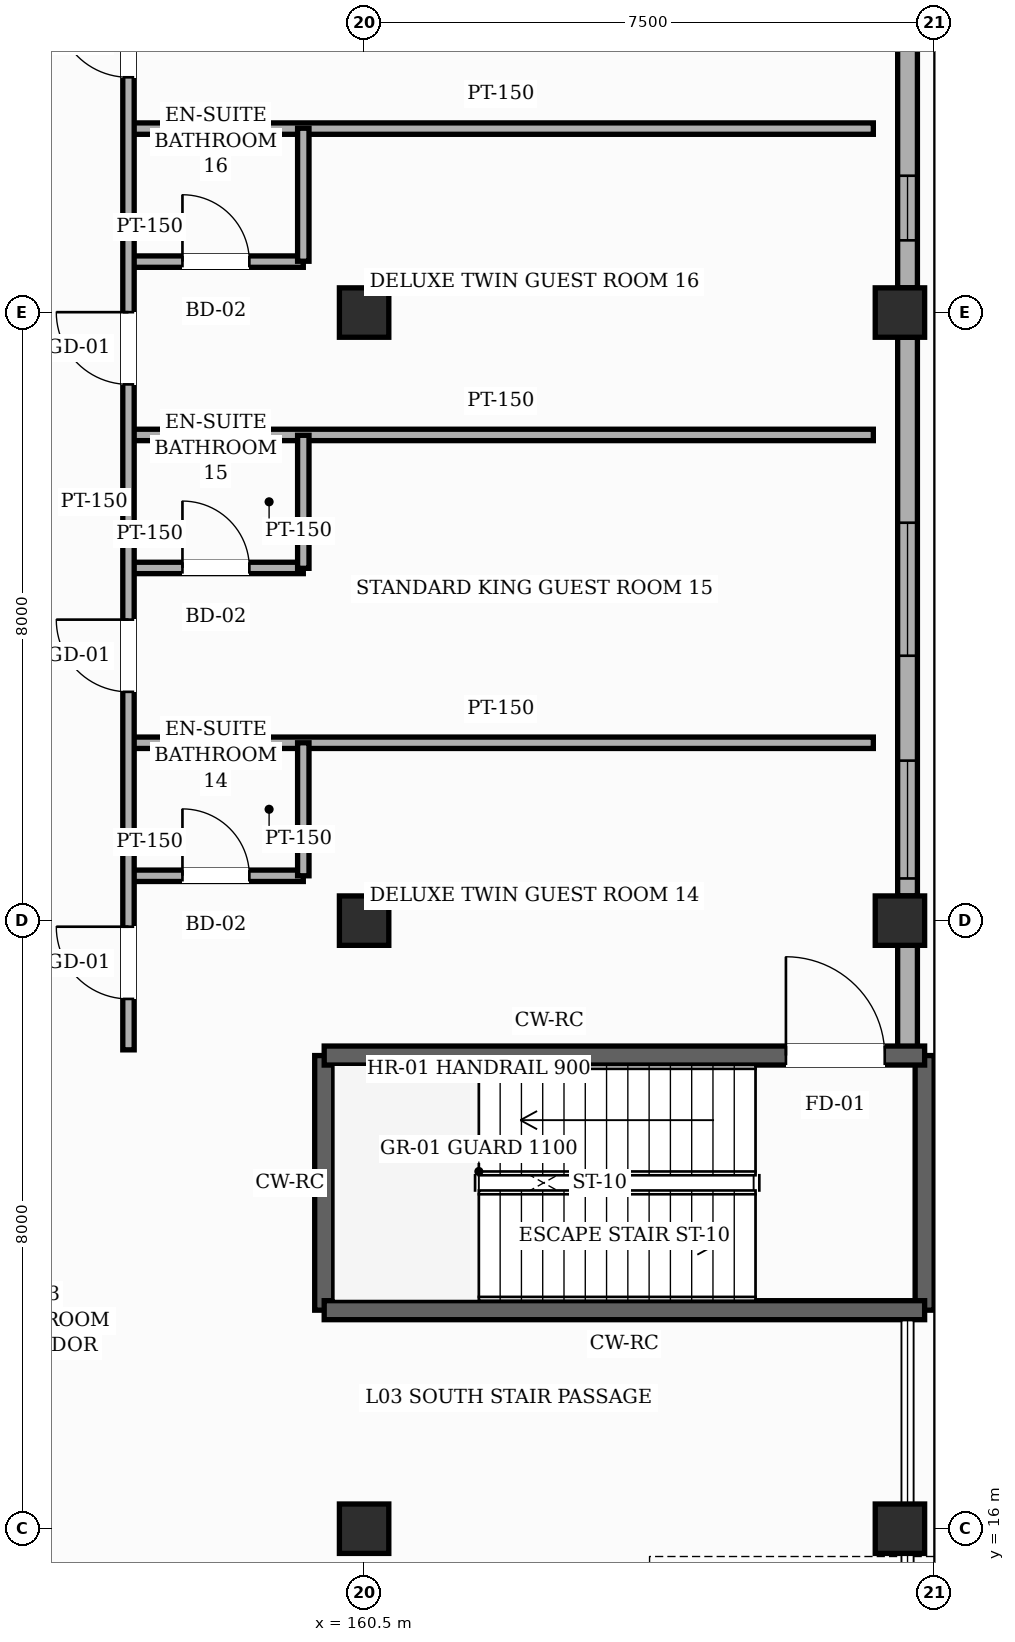
"""IFC4 building model, lengths in metres.
Left out: names, types, materials, properties, quantities, classifications, styles, units other than length and angle.
Written with IfcOpenShell. Run it as: python <this file> out.ifc"""

import sys

from ifc_helpers import new_model, si_unit, direction, frame, frame_2d, origin, origin_2d, place, context, subcontext, project, spatial, rectangle, hollow_rectangle, extrude, element, fill, save


model = new_model("IFC4")
c1 = context("Model", 3, precision=1e-05, world=origin(), true_north=direction((0.0, 1.0)))
c2 = subcontext(c1, "Body", "Model", "MODEL_VIEW")
j1 = project(units=[si_unit("LENGTHUNIT", "METRE"), si_unit("PLANEANGLEUNIT", "RADIAN")], contexts=[c1])
p1 = place(None, origin())
s1 = spatial("IfcSite", under=j1, at=p1, CompositionType="ELEMENT")
p2 = place(p1, origin())
s2 = spatial("IfcBuilding", under=s1, at=p2, CompositionType="ELEMENT")
p3 = place(p2, frame((0.0, 0.0, 15.0)))
s3 = spatial("IfcBuildingStorey", under=s2, at=p3, CompositionType="ELEMENT", Elevation=15.0)
for number, where, z_axis, x_axis in (
    (1, (160.5, 16.0, 0.0), (0.0, 0.0, 1.0), (1.0, 0.0, 0.0)),
    (2, (160.5, 24.0, 0.0), (0.0, 0.0, 1.0), (1.0, 0.0, 0.0)),
    (3, (160.5, 32.0, 0.0), (0.0, 0.0, 1.0), (1.0, 0.0, 0.0)),
    (4, (167.55, 16.0, 0.0), (0.0, 0.0, 1.0), (1.0, 0.0, 0.0)),
    (5, (167.55, 24.0, 0.0), (0.0, 0.0, 1.0), (1.0, 0.0, 0.0)),
    (6, (167.55, 32.0, 0.0), (0.0, 0.0, 1.0), (1.0, 0.0, 0.0)),
):
    element("IfcColumn", number, at=place(p3, frame(where, z_axis=z_axis, x_axis=x_axis)), inside=s3, PredefinedType="COLUMN", context=c2, shape_type="SweptSolid", body=[
        extrude(hollow_rectangle(XDim=0.65, YDim=0.65, WallThickness=0.025, InnerFilletRadius=0.025, OuterFilletRadius=0.05, at=origin_2d()), origin(), (0.0, 0.0, 1.0), 4.8),
    ])
p4 = place(p3, frame((167.65, 23.675, 0.0), z_axis=(0.0, 0.0, 1.0), x_axis=(0.0, -1.0, 0.0)))
e7 = element("IfcWall", 7, at=p4, inside=s3, PredefinedType="SOLIDWALL", context=c2, shape_type="SweptSolid", body=[
    extrude(rectangle(XDim=1.45, YDim=0.26, at=frame_2d((0.725, 0.0))), origin(), (0.0, 0.0, 1.0), 4.545),
])
p5 = place(p3, frame((167.65, 31.675, 0.0), z_axis=(0.0, 0.0, 1.0), x_axis=(0.0, -1.0, 0.0)))
e8 = element("IfcWall", 8, at=p5, inside=s3, PredefinedType="SOLIDWALL", context=c2, shape_type="SweptSolid", body=[
    extrude(rectangle(XDim=7.35, YDim=0.26, at=frame_2d((3.675, 0.0))), origin(), (0.0, 0.0, 1.0), 3.885),
])
p6 = place(p5, frame((5.57, 0.0, 0.85)))
e9 = element("IfcOpeningElement", 9, at=p6, cuts=e8, PredefinedType="OPENING", context=c2, shape_type="SweptSolid", body=[
    extrude(rectangle(XDim=1.55, YDim=1.95, at=frame_2d((0.775, 0.975))), frame((0.0, 0.14, 0.0), z_axis=(0.0, -1.0, 0.0), x_axis=(1.0, 0.0, 0.0)), (0.0, 0.0, 1.0), 0.28),
])
p7 = place(p5, frame((2.44, 0.0, 0.85)))
e10 = element("IfcOpeningElement", 10, at=p7, cuts=e8, PredefinedType="OPENING", context=c2, shape_type="SweptSolid", body=[
    extrude(rectangle(XDim=1.75, YDim=1.95, at=frame_2d((0.875, 0.975))), frame((0.0, 0.14, 0.0), z_axis=(0.0, -1.0, 0.0), x_axis=(1.0, 0.0, 0.0)), (0.0, 0.0, 1.0), 0.28),
])
p8 = place(p3, frame((167.65, 40.575, 0.0), z_axis=(0.0, 0.0, 1.0), x_axis=(0.0, -1.0, 0.0)))
e11 = element("IfcWall", 11, at=p8, inside=s3, PredefinedType="SOLIDWALL", context=c2, shape_type="SweptSolid", body=[
    extrude(rectangle(XDim=8.25, YDim=0.26, at=frame_2d((4.125, 0.0))), origin(), (0.0, 0.0, 1.0), 3.885),
])
p9 = place(p8, frame((6.775, 0.0, 0.85)))
e12 = element("IfcOpeningElement", 12, at=p9, cuts=e11, PredefinedType="OPENING", context=c2, shape_type="SweptSolid", body=[
    extrude(rectangle(XDim=0.85, YDim=1.35, at=frame_2d((0.425, 0.675))), frame((0.0, 0.14, 0.0), z_axis=(0.0, -1.0, 0.0), x_axis=(1.0, 0.0, 0.0)), (0.0, 0.0, 1.0), 0.28),
])
p10 = place(p8, frame((3.555, 0.0, 0.85)))
e13 = element("IfcOpeningElement", 13, at=p10, cuts=e11, PredefinedType="OPENING", context=c2, shape_type="SweptSolid", body=[
    extrude(rectangle(XDim=1.15, YDim=1.35, at=frame_2d((0.575, 0.675))), frame((0.0, 0.14, 0.0), z_axis=(0.0, -1.0, 0.0), x_axis=(1.0, 0.0, 0.0)), (0.0, 0.0, 1.0), 0.28),
])
p11 = place(p8, frame((0.38, 0.0, 0.85)))
e14 = element("IfcOpeningElement", 14, at=p11, cuts=e11, PredefinedType="OPENING", context=c2, shape_type="SweptSolid", body=[
    extrude(rectangle(XDim=1.35, YDim=1.35, at=frame_2d((0.675, 0.675))), frame((0.0, 0.14, 0.0), z_axis=(0.0, -1.0, 0.0), x_axis=(1.0, 0.0, 0.0)), (0.0, 0.0, 1.0), 0.28),
])
for number, where, z_axis, x_axis in (
    (15, (167.875, 22.225, 0.0), (0.0, 0.0, 1.0), (0.0, -1.0, 0.0)),
    (16, (159.975, 18.875, 0.0), (0.0, 0.0, 1.0), (0.0, 1.0, 0.0)),
):
    element("IfcWall", number, at=place(p3, frame(where, z_axis=z_axis, x_axis=x_axis)), inside=s3, PredefinedType="SHEAR", context=c2, shape_type="SweptSolid", body=[
        extrude(rectangle(XDim=3.35, YDim=0.25, at=frame_2d((1.675, 0.0))), origin(), (0.0, 0.0, 1.0), 4.56),
    ])
p12 = place(p3, frame((159.975, 22.225, 0.0), z_axis=(0.0, 0.0, 1.0), x_axis=(1.0, 0.0, 0.0)))
e17 = element("IfcWall", 17, at=p12, inside=s3, PredefinedType="SHEAR", context=c2, shape_type="SweptSolid", body=[
    extrude(rectangle(XDim=7.9, YDim=0.25, at=frame_2d((3.95, 0.0))), origin(), (0.0, 0.0, 1.0), 4.56),
])
p13 = place(p12, frame((6.075, 0.0, 0.0)))
e18 = element("IfcOpeningElement", 18, at=p13, cuts=e17, PredefinedType="OPENING", context=c2, shape_type="SweptSolid", body=[
    extrude(rectangle(XDim=1.3, YDim=2.2, at=frame_2d((0.65, 1.1))), frame((0.0, 0.135, 0.0), z_axis=(0.0, -1.0, 0.0), x_axis=(1.0, 0.0, 0.0)), (0.0, 0.0, 1.0), 0.27),
])
p14 = place(p3, frame((167.875, 18.875, 0.0), z_axis=(0.0, 0.0, 1.0), x_axis=(-1.0, 0.0, 0.0)))
e19 = element("IfcWall", 19, at=p14, inside=s3, PredefinedType="SHEAR", context=c2, shape_type="SweptSolid", body=[
    extrude(rectangle(XDim=7.9, YDim=0.25, at=frame_2d((3.95, 0.0))), origin(), (0.0, 0.0, 1.0), 4.56),
])
p15 = place(p3, frame((157.4, 24.59, 0.0), z_axis=(0.0, 0.0, 1.0), x_axis=(1.0, 0.0, 0.0)))
e20 = element("IfcWall", 20, at=p15, inside=s3, PredefinedType="PARTITIONING", context=c2, shape_type="SweptSolid", body=[
    extrude(rectangle(XDim=2.3, YDim=0.15, at=frame_2d((1.15, 0.0))), origin(), (0.0, 0.0, 1.0), 4.545),
])
p16 = place(p15, frame((0.71, 0.0, 0.0)))
e21 = element("IfcOpeningElement", 21, at=p16, cuts=e20, PredefinedType="OPENING", context=c2, shape_type="SweptSolid", body=[
    extrude(rectangle(XDim=0.88, YDim=2.12, at=frame_2d((0.44, 1.06))), frame((0.0, 0.085, 0.0), z_axis=(0.0, -1.0, 0.0), x_axis=(1.0, 0.0, 0.0)), (0.0, 0.0, 1.0), 0.17),
])
p17 = place(p3, frame((157.4, 26.34, 0.0), z_axis=(0.0, 0.0, 1.0), x_axis=(1.0, 0.0, 0.0)))
e22 = element("IfcWall", 22, at=p17, inside=s3, PredefinedType="PARTITIONING", context=c2, shape_type="SweptSolid", body=[
    extrude(rectangle(XDim=9.8, YDim=0.15, at=frame_2d((4.9, 0.0))), origin(), (0.0, 0.0, 1.0), 4.545),
])
p18 = place(p3, frame((157.4, 28.64, 0.0), z_axis=(0.0, 0.0, 1.0), x_axis=(1.0, 0.0, 0.0)))
e23 = element("IfcWall", 23, at=p18, inside=s3, PredefinedType="PARTITIONING", context=c2, shape_type="SweptSolid", body=[
    extrude(rectangle(XDim=2.3, YDim=0.15, at=frame_2d((1.15, 0.0))), origin(), (0.0, 0.0, 1.0), 4.545),
])
p19 = place(p18, frame((0.71, 0.0, 0.0)))
e24 = element("IfcOpeningElement", 24, at=p19, cuts=e23, PredefinedType="OPENING", context=c2, shape_type="SweptSolid", body=[
    extrude(rectangle(XDim=0.88, YDim=2.12, at=frame_2d((0.44, 1.06))), frame((0.0, 0.085, 0.0), z_axis=(0.0, -1.0, 0.0), x_axis=(1.0, 0.0, 0.0)), (0.0, 0.0, 1.0), 0.17),
])
p20 = place(p3, frame((157.4, 30.39, 0.0), z_axis=(0.0, 0.0, 1.0), x_axis=(1.0, 0.0, 0.0)))
e25 = element("IfcWall", 25, at=p20, inside=s3, PredefinedType="PARTITIONING", context=c2, shape_type="SweptSolid", body=[
    extrude(rectangle(XDim=9.8, YDim=0.15, at=frame_2d((4.9, 0.0))), origin(), (0.0, 0.0, 1.0), 4.545),
])
p21 = place(p3, frame((157.4, 32.67, 0.0), z_axis=(0.0, 0.0, 1.0), x_axis=(1.0, 0.0, 0.0)))
e26 = element("IfcWall", 26, at=p21, inside=s3, PredefinedType="PARTITIONING", context=c2, shape_type="SweptSolid", body=[
    extrude(rectangle(XDim=2.3, YDim=0.15, at=frame_2d((1.15, 0.0))), origin(), (0.0, 0.0, 1.0), 4.545),
])
p22 = place(p21, frame((0.71, 0.0, 0.0)))
e27 = element("IfcOpeningElement", 27, at=p22, cuts=e26, PredefinedType="OPENING", context=c2, shape_type="SweptSolid", body=[
    extrude(rectangle(XDim=0.88, YDim=2.12, at=frame_2d((0.44, 1.06))), frame((0.0, 0.085, 0.0), z_axis=(0.0, -1.0, 0.0), x_axis=(1.0, 0.0, 0.0)), (0.0, 0.0, 1.0), 0.17),
])
p23 = place(p3, frame((157.4, 34.42, 0.0), z_axis=(0.0, 0.0, 1.0), x_axis=(1.0, 0.0, 0.0)))
e28 = element("IfcWall", 28, at=p23, inside=s3, PredefinedType="PARTITIONING", context=c2, shape_type="SweptSolid", body=[
    extrude(rectangle(XDim=9.8, YDim=0.15, at=frame_2d((4.9, 0.0))), origin(), (0.0, 0.0, 1.0), 4.545),
])
p24 = place(p3, frame((157.4, 22.3, 0.0), z_axis=(0.0, 0.0, 1.0), x_axis=(0.0, 1.0, 0.0)))
e29 = element("IfcWall", 29, at=p24, inside=s3, PredefinedType="PARTITIONING", context=c2, shape_type="SweptSolid", body=[
    extrude(rectangle(XDim=48.5, YDim=0.15, at=frame_2d((24.25, 0.0))), origin(), (0.0, 0.0, 1.0), 4.545),
])
p25 = place(p24, frame((0.67, 0.0, 0.0)))
e30 = element("IfcOpeningElement", 30, at=p25, cuts=e29, PredefinedType="OPENING", context=c2, shape_type="SweptSolid", body=[
    extrude(rectangle(XDim=0.95, YDim=2.15, at=frame_2d((0.475, 1.075))), frame((0.0, 0.085, 0.0), z_axis=(0.0, -1.0, 0.0), x_axis=(1.0, 0.0, 0.0)), (0.0, 0.0, 1.0), 0.17),
])
p26 = place(p24, frame((4.71, 0.0, 0.0)))
e31 = element("IfcOpeningElement", 31, at=p26, cuts=e29, PredefinedType="OPENING", context=c2, shape_type="SweptSolid", body=[
    extrude(rectangle(XDim=0.95, YDim=2.15, at=frame_2d((0.475, 1.075))), frame((0.0, 0.085, 0.0), z_axis=(0.0, -1.0, 0.0), x_axis=(1.0, 0.0, 0.0)), (0.0, 0.0, 1.0), 0.17),
])
p27 = place(p24, frame((8.755, 0.0, 0.0)))
e32 = element("IfcOpeningElement", 32, at=p27, cuts=e29, PredefinedType="OPENING", context=c2, shape_type="SweptSolid", body=[
    extrude(rectangle(XDim=0.95, YDim=2.15, at=frame_2d((0.475, 1.075))), frame((0.0, 0.085, 0.0), z_axis=(0.0, -1.0, 0.0), x_axis=(1.0, 0.0, 0.0)), (0.0, 0.0, 1.0), 0.17),
])
p28 = place(p24, frame((12.795, 0.0, 0.0)))
e33 = element("IfcOpeningElement", 33, at=p28, cuts=e29, PredefinedType="OPENING", context=c2, shape_type="SweptSolid", body=[
    extrude(rectangle(XDim=0.95, YDim=2.15, at=frame_2d((0.475, 1.075))), frame((0.0, 0.085, 0.0), z_axis=(0.0, -1.0, 0.0), x_axis=(1.0, 0.0, 0.0)), (0.0, 0.0, 1.0), 0.17),
])
p29 = place(p24, frame((16.835, 0.0, 0.0)))
e34 = element("IfcOpeningElement", 34, at=p29, cuts=e29, PredefinedType="OPENING", context=c2, shape_type="SweptSolid", body=[
    extrude(rectangle(XDim=0.95, YDim=2.15, at=frame_2d((0.475, 1.075))), frame((0.0, 0.085, 0.0), z_axis=(0.0, -1.0, 0.0), x_axis=(1.0, 0.0, 0.0)), (0.0, 0.0, 1.0), 0.17),
])
p30 = place(p24, frame((20.88, 0.0, 0.0)))
e35 = element("IfcOpeningElement", 35, at=p30, cuts=e29, PredefinedType="OPENING", context=c2, shape_type="SweptSolid", body=[
    extrude(rectangle(XDim=0.95, YDim=2.15, at=frame_2d((0.475, 1.075))), frame((0.0, 0.085, 0.0), z_axis=(0.0, -1.0, 0.0), x_axis=(1.0, 0.0, 0.0)), (0.0, 0.0, 1.0), 0.17),
])
p31 = place(p24, frame((24.92, 0.0, 0.0)))
e36 = element("IfcOpeningElement", 36, at=p31, cuts=e29, PredefinedType="OPENING", context=c2, shape_type="SweptSolid", body=[
    extrude(rectangle(XDim=0.95, YDim=2.15, at=frame_2d((0.475, 1.075))), frame((0.0, 0.085, 0.0), z_axis=(0.0, -1.0, 0.0), x_axis=(1.0, 0.0, 0.0)), (0.0, 0.0, 1.0), 0.17),
])
p32 = place(p24, frame((28.96, 0.0, 0.0)))
e37 = element("IfcOpeningElement", 37, at=p32, cuts=e29, PredefinedType="OPENING", context=c2, shape_type="SweptSolid", body=[
    extrude(rectangle(XDim=0.95, YDim=2.15, at=frame_2d((0.475, 1.075))), frame((0.0, 0.085, 0.0), z_axis=(0.0, -1.0, 0.0), x_axis=(1.0, 0.0, 0.0)), (0.0, 0.0, 1.0), 0.17),
])
p33 = place(p24, frame((33.005, 0.0, 0.0)))
e38 = element("IfcOpeningElement", 38, at=p33, cuts=e29, PredefinedType="OPENING", context=c2, shape_type="SweptSolid", body=[
    extrude(rectangle(XDim=0.95, YDim=2.15, at=frame_2d((0.475, 1.075))), frame((0.0, 0.085, 0.0), z_axis=(0.0, -1.0, 0.0), x_axis=(1.0, 0.0, 0.0)), (0.0, 0.0, 1.0), 0.17),
])
p34 = place(p24, frame((37.045, 0.0, 0.0)))
e39 = element("IfcOpeningElement", 39, at=p34, cuts=e29, PredefinedType="OPENING", context=c2, shape_type="SweptSolid", body=[
    extrude(rectangle(XDim=0.95, YDim=2.15, at=frame_2d((0.475, 1.075))), frame((0.0, 0.085, 0.0), z_axis=(0.0, -1.0, 0.0), x_axis=(1.0, 0.0, 0.0)), (0.0, 0.0, 1.0), 0.17),
])
p35 = place(p24, frame((41.09, 0.0, 0.0)))
e40 = element("IfcOpeningElement", 40, at=p35, cuts=e29, PredefinedType="OPENING", context=c2, shape_type="SweptSolid", body=[
    extrude(rectangle(XDim=0.95, YDim=2.15, at=frame_2d((0.475, 1.075))), frame((0.0, 0.085, 0.0), z_axis=(0.0, -1.0, 0.0), x_axis=(1.0, 0.0, 0.0)), (0.0, 0.0, 1.0), 0.17),
])
p36 = place(p24, frame((45.13, 0.0, 0.0)))
e41 = element("IfcOpeningElement", 41, at=p36, cuts=e29, PredefinedType="OPENING", context=c2, shape_type="SweptSolid", body=[
    extrude(rectangle(XDim=0.95, YDim=2.15, at=frame_2d((0.475, 1.075))), frame((0.0, 0.085, 0.0), z_axis=(0.0, -1.0, 0.0), x_axis=(1.0, 0.0, 0.0)), (0.0, 0.0, 1.0), 0.17),
])
for number, where, z_axis, x_axis in (
    (42, (159.7, 24.59, 0.0), (0.0, 0.0, 1.0), (0.0, 1.0, 0.0)),
    (43, (159.7, 28.635, 0.0), (0.0, 0.0, 1.0), (0.0, 1.0, 0.0)),
    (44, (159.7, 32.675, 0.0), (0.0, 0.0, 1.0), (0.0, 1.0, 0.0)),
):
    element("IfcWall", number, at=place(p3, frame(where, z_axis=z_axis, x_axis=x_axis)), inside=s3, PredefinedType="PARTITIONING", context=c2, shape_type="SweptSolid", body=[
        extrude(rectangle(XDim=1.75, YDim=0.15, at=frame_2d((0.875, 0.0))), origin(), (0.0, 0.0, 1.0), 4.545),
    ])
p37 = place(p6, origin())
e45 = element("IfcWindow", 45, at=p37, inside=s3, PartitioningType="SINGLE_PANEL", PredefinedType="WINDOW", context=c2, shape_type="SweptSolid", body=[
    extrude(rectangle(XDim=1.55, YDim=1.95, at=frame_2d((0.775, 0.975))), frame((0.0, 0.03, 0.0), z_axis=(0.0, -1.0, 0.0), x_axis=(1.0, 0.0, 0.0)), (0.0, 0.0, 1.0), 0.06),
])
fill(e9, e45)
p38 = place(p7, origin())
e46 = element("IfcWindow", 46, at=p38, inside=s3, PartitioningType="SINGLE_PANEL", PredefinedType="WINDOW", context=c2, shape_type="SweptSolid", body=[
    extrude(rectangle(XDim=1.75, YDim=1.95, at=frame_2d((0.875, 0.975))), frame((0.0, 0.03, 0.0), z_axis=(0.0, -1.0, 0.0), x_axis=(1.0, 0.0, 0.0)), (0.0, 0.0, 1.0), 0.06),
])
fill(e10, e46)
p39 = place(p9, origin())
e47 = element("IfcWindow", 47, at=p39, inside=s3, PartitioningType="SINGLE_PANEL", PredefinedType="WINDOW", context=c2, shape_type="SweptSolid", body=[
    extrude(rectangle(XDim=0.85, YDim=1.35, at=frame_2d((0.425, 0.675))), frame((0.0, 0.03, 0.0), z_axis=(0.0, -1.0, 0.0), x_axis=(1.0, 0.0, 0.0)), (0.0, 0.0, 1.0), 0.06),
])
fill(e12, e47)
p40 = place(p13, origin())
e48 = element("IfcDoor", 48, at=p40, inside=s3, OperationType="SINGLE_SWING_LEFT", PredefinedType="DOOR", context=c2, shape_type="SweptSolid", body=[
    extrude(rectangle(XDim=1.3, YDim=2.2, at=frame_2d((0.65, 1.1))), frame((0.0, 0.025, 0.0), z_axis=(0.0, -1.0, 0.0), x_axis=(1.0, 0.0, 0.0)), (0.0, 0.0, 1.0), 0.05),
])
fill(e18, e48)
p41 = place(p25, origin())
e49 = element("IfcDoor", 49, at=p41, inside=s3, OperationType="SINGLE_SWING_RIGHT", PredefinedType="DOOR", context=c2, shape_type="SweptSolid", body=[
    extrude(rectangle(XDim=0.95, YDim=2.15, at=frame_2d((0.475, 1.075))), frame((0.0, 0.025, 0.0), z_axis=(0.0, -1.0, 0.0), x_axis=(1.0, 0.0, 0.0)), (0.0, 0.0, 1.0), 0.05),
])
fill(e30, e49)
p42 = place(p16, origin())
e50 = element("IfcDoor", 50, at=p42, inside=s3, OperationType="SINGLE_SWING_LEFT", PredefinedType="DOOR", context=c2, shape_type="SweptSolid", body=[
    extrude(rectangle(XDim=0.88, YDim=2.12, at=frame_2d((0.44, 1.06))), frame((0.0, 0.025, 0.0), z_axis=(0.0, -1.0, 0.0), x_axis=(1.0, 0.0, 0.0)), (0.0, 0.0, 1.0), 0.05),
])
fill(e21, e50)
p43 = place(p26, origin())
e51 = element("IfcDoor", 51, at=p43, inside=s3, OperationType="SINGLE_SWING_RIGHT", PredefinedType="DOOR", context=c2, shape_type="SweptSolid", body=[
    extrude(rectangle(XDim=0.95, YDim=2.15, at=frame_2d((0.475, 1.075))), frame((0.0, 0.025, 0.0), z_axis=(0.0, -1.0, 0.0), x_axis=(1.0, 0.0, 0.0)), (0.0, 0.0, 1.0), 0.05),
])
fill(e31, e51)
p44 = place(p19, origin())
e52 = element("IfcDoor", 52, at=p44, inside=s3, OperationType="SINGLE_SWING_LEFT", PredefinedType="DOOR", context=c2, shape_type="SweptSolid", body=[
    extrude(rectangle(XDim=0.88, YDim=2.12, at=frame_2d((0.44, 1.06))), frame((0.0, 0.025, 0.0), z_axis=(0.0, -1.0, 0.0), x_axis=(1.0, 0.0, 0.0)), (0.0, 0.0, 1.0), 0.05),
])
fill(e24, e52)
p45 = place(p27, origin())
e53 = element("IfcDoor", 53, at=p45, inside=s3, OperationType="SINGLE_SWING_RIGHT", PredefinedType="DOOR", context=c2, shape_type="SweptSolid", body=[
    extrude(rectangle(XDim=0.95, YDim=2.15, at=frame_2d((0.475, 1.075))), frame((0.0, 0.025, 0.0), z_axis=(0.0, -1.0, 0.0), x_axis=(1.0, 0.0, 0.0)), (0.0, 0.0, 1.0), 0.05),
])
fill(e32, e53)
p46 = place(p22, origin())
e54 = element("IfcDoor", 54, at=p46, inside=s3, OperationType="SINGLE_SWING_LEFT", PredefinedType="DOOR", context=c2, shape_type="SweptSolid", body=[
    extrude(rectangle(XDim=0.88, YDim=2.12, at=frame_2d((0.44, 1.06))), frame((0.0, 0.025, 0.0), z_axis=(0.0, -1.0, 0.0), x_axis=(1.0, 0.0, 0.0)), (0.0, 0.0, 1.0), 0.05),
])
fill(e27, e54)
p47 = place(p28, origin())
e55 = element("IfcDoor", 55, at=p47, inside=s3, OperationType="SINGLE_SWING_RIGHT", PredefinedType="DOOR", context=c2, shape_type="SweptSolid", body=[
    extrude(rectangle(XDim=0.95, YDim=2.15, at=frame_2d((0.475, 1.075))), frame((0.0, 0.025, 0.0), z_axis=(0.0, -1.0, 0.0), x_axis=(1.0, 0.0, 0.0)), (0.0, 0.0, 1.0), 0.05),
])
fill(e33, e55)
save(model, sys.argv[1])
